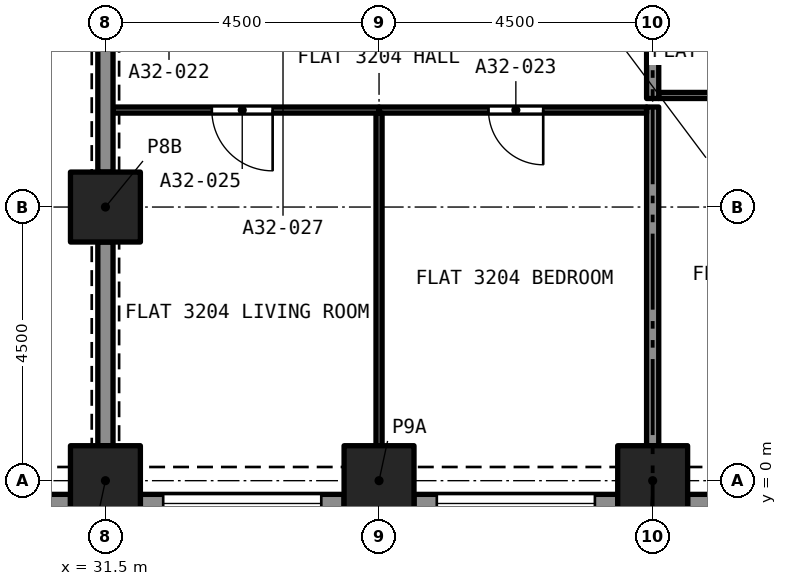
"""IFC4 building model, lengths in metres.
Left out: names, types, materials, properties, quantities, classifications, styles, units other than length and angle.
Written with IfcOpenShell. Run it as: python <this file> out.ifc"""

import sys

from ifc_helpers import new_model, si_unit, direction, frame, frame_2d, origin, origin_2d, place, context, subcontext, project, spatial, rectangle, extrude, element, fill, save


model = new_model("IFC4")
c1 = context("Model", 3, precision=1e-05, world=origin(), true_north=direction((0.0, 1.0)))
c2 = subcontext(c1, "Body", "Model", "MODEL_VIEW")
j1 = project(units=[si_unit("LENGTHUNIT", "METRE"), si_unit("PLANEANGLEUNIT", "RADIAN")], contexts=[c1])
p1 = place(None, origin())
s1 = spatial("IfcSite", under=j1, at=p1, CompositionType="ELEMENT")
p2 = place(p1, origin())
s2 = spatial("IfcBuilding", under=s1, at=p2, CompositionType="ELEMENT")
p3 = place(p2, frame((0.0, 0.0, 115.2)))
s3 = spatial("IfcBuildingStorey", under=s2, at=p3, CompositionType="ELEMENT", Elevation=115.2)
for number, where, z_axis, x_axis in (
    (1, (31.5, 0.0, 0.0), (0.0, 0.0, 1.0), (1.0, 0.0, 0.0)),
    (2, (36.0, 0.0, 0.0), (0.0, 0.0, 1.0), (1.0, 0.0, 0.0)),
    (3, (40.5, 0.0, 0.0), (0.0, 0.0, 1.0), (1.0, 0.0, 0.0)),
    (4, (31.5, 4.5, 0.0), (0.0, 0.0, 1.0), (1.0, 0.0, 0.0)),
):
    element("IfcColumn", number, at=place(p3, frame(where, z_axis=z_axis, x_axis=x_axis)), inside=s3, PredefinedType="COLUMN", context=c2, shape_type="SweptSolid", body=[
        extrude(rectangle(XDim=1.15, YDim=1.15, at=origin_2d()), origin(), (0.0, 0.0, 1.0), 3.2),
    ])
p4 = place(p3, frame((30.925, -0.375, 0.0), z_axis=(0.0, 0.0, 1.0), x_axis=(-1.0, 0.0, 0.0)))
e5 = element("IfcWall", 5, at=p4, inside=s3, PredefinedType="SOLIDWALL", context=c2, shape_type="SweptSolid", body=[
    extrude(rectangle(XDim=3.35, YDim=0.3, at=frame_2d((1.675, 0.0))), origin(), (0.0, 0.0, 1.0), 3.2),
])
p5 = place(p4, frame((0.375, 0.0, 0.45)))
e6 = element("IfcOpeningElement", 6, at=p5, cuts=e5, PredefinedType="OPENING", context=c2, shape_type="SweptSolid", body=[
    extrude(rectangle(XDim=2.6, YDim=1.95, at=frame_2d((1.3, 0.975))), frame((0.0, 0.16, 0.0), z_axis=(0.0, -1.0, 0.0), x_axis=(1.0, 0.0, 0.0)), (0.0, 0.0, 1.0), 0.32),
])
p6 = place(p3, frame((35.425, -0.375, 0.0), z_axis=(0.0, 0.0, 1.0), x_axis=(-1.0, 0.0, 0.0)))
e7 = element("IfcWall", 7, at=p6, inside=s3, PredefinedType="SOLIDWALL", context=c2, shape_type="SweptSolid", body=[
    extrude(rectangle(XDim=3.35, YDim=0.3, at=frame_2d((1.675, 0.0))), origin(), (0.0, 0.0, 1.0), 3.2),
])
p7 = place(p6, frame((0.375, 0.0, 0.45)))
e8 = element("IfcOpeningElement", 8, at=p7, cuts=e7, PredefinedType="OPENING", context=c2, shape_type="SweptSolid", body=[
    extrude(rectangle(XDim=2.6, YDim=1.95, at=frame_2d((1.3, 0.975))), frame((0.0, 0.16, 0.0), z_axis=(0.0, -1.0, 0.0), x_axis=(1.0, 0.0, 0.0)), (0.0, 0.0, 1.0), 0.32),
])
p8 = place(p3, frame((39.925, -0.375, 0.0), z_axis=(0.0, 0.0, 1.0), x_axis=(-1.0, 0.0, 0.0)))
e9 = element("IfcWall", 9, at=p8, inside=s3, PredefinedType="SOLIDWALL", context=c2, shape_type="SweptSolid", body=[
    extrude(rectangle(XDim=3.35, YDim=0.3, at=frame_2d((1.675, 0.0))), origin(), (0.0, 0.0, 1.0), 3.2),
])
p9 = place(p8, frame((0.375, 0.0, 0.45)))
e10 = element("IfcOpeningElement", 10, at=p9, cuts=e9, PredefinedType="OPENING", context=c2, shape_type="SweptSolid", body=[
    extrude(rectangle(XDim=2.6, YDim=1.95, at=frame_2d((1.3, 0.975))), frame((0.0, 0.16, 0.0), z_axis=(0.0, -1.0, 0.0), x_axis=(1.0, 0.0, 0.0)), (0.0, 0.0, 1.0), 0.32),
])
p10 = place(p3, frame((44.425, -0.375, 0.0), z_axis=(0.0, 0.0, 1.0), x_axis=(-1.0, 0.0, 0.0)))
e11 = element("IfcWall", 11, at=p10, inside=s3, PredefinedType="SOLIDWALL", context=c2, shape_type="SweptSolid", body=[
    extrude(rectangle(XDim=3.35, YDim=0.3, at=frame_2d((1.675, 0.0))), origin(), (0.0, 0.0, 1.0), 3.2),
])
p11 = place(p10, frame((0.375, 0.0, 0.45)))
e12 = element("IfcOpeningElement", 12, at=p11, cuts=e11, PredefinedType="OPENING", context=c2, shape_type="SweptSolid", body=[
    extrude(rectangle(XDim=2.6, YDim=1.95, at=frame_2d((1.3, 0.975))), frame((0.0, 0.16, 0.0), z_axis=(0.0, -1.0, 0.0), x_axis=(1.0, 0.0, 0.0)), (0.0, 0.0, 1.0), 0.32),
])
p12 = place(p3, frame((44.95, 6.335, 0.0), z_axis=(0.0, 0.0, 1.0), x_axis=(-1.0, 0.0, 0.0)))
e13 = element("IfcWall", 13, at=p12, inside=s3, PredefinedType="PARTITIONING", context=c2, shape_type="SweptSolid", body=[
    extrude(rectangle(XDim=4.35, YDim=0.1, at=frame_2d((2.175, 0.0))), origin(), (0.0, 0.0, 1.0), 2.9),
])
p13 = place(p12, frame((1.75, 0.0, 0.0)))
e14 = element("IfcOpeningElement", 14, at=p13, cuts=e13, PredefinedType="OPENING", context=c2, shape_type="SweptSolid", body=[
    extrude(rectangle(XDim=0.9, YDim=2.1, at=frame_2d((0.45, 1.05))), frame((0.0, 0.06, 0.0), z_axis=(0.0, -1.0, 0.0), x_axis=(1.0, 0.0, 0.0)), (0.0, 0.0, 1.0), 0.12),
])
p14 = place(p3, frame((40.5, 0.575, 0.0), z_axis=(0.0, 0.0, 1.0), x_axis=(0.0, 1.0, 0.0)))
e15 = element("IfcWall", 15, at=p14, inside=s3, PredefinedType="PARTITIONING", context=c2, shape_type="SweptSolid", body=[
    extrude(rectangle(XDim=5.57, YDim=0.2, at=frame_2d((2.785, 0.0))), origin(), (0.0, 0.0, 1.0), 2.9),
])
p15 = place(p3, frame((40.5, 6.285, 0.0), z_axis=(0.0, 0.0, 1.0), x_axis=(0.0, 1.0, 0.0)))
e16 = element("IfcWall", 16, at=p15, inside=s3, PredefinedType="PARTITIONING", context=c2, shape_type="SweptSolid", body=[
    extrude(rectangle(XDim=7.715, YDim=0.2, at=frame_2d((3.857, 0.0))), origin(), (0.0, 0.0, 1.0), 2.9),
])
p16 = place(p3, frame((40.4, 6.095, 0.0), z_axis=(0.0, 0.0, 1.0), x_axis=(-1.0, 0.0, 0.0)))
e17 = element("IfcWall", 17, at=p16, inside=s3, PredefinedType="PARTITIONING", context=c2, shape_type="SweptSolid", body=[
    extrude(rectangle(XDim=4.4, YDim=0.1, at=frame_2d((2.2, 0.0))), origin(), (0.0, 0.0, 1.0), 2.9),
])
p17 = place(p16, frame((1.7, 0.0, 0.0)))
e18 = element("IfcOpeningElement", 18, at=p17, cuts=e17, PredefinedType="OPENING", context=c2, shape_type="SweptSolid", body=[
    extrude(rectangle(XDim=0.9, YDim=2.1, at=frame_2d((0.45, 1.05))), frame((0.0, 0.06, 0.0), z_axis=(0.0, -1.0, 0.0), x_axis=(1.0, 0.0, 0.0)), (0.0, 0.0, 1.0), 0.12),
])
p18 = place(p3, frame((36.0, 0.575, 0.0), z_axis=(0.0, 0.0, 1.0), x_axis=(0.0, 1.0, 0.0)))
e19 = element("IfcWall", 19, at=p18, inside=s3, PredefinedType="PARTITIONING", context=c2, shape_type="SweptSolid", body=[
    extrude(rectangle(XDim=5.47, YDim=0.1, at=frame_2d((2.735, 0.0))), origin(), (0.0, 0.0, 1.0), 2.9),
])
p19 = place(p3, frame((36.0, 6.095, 0.0), z_axis=(0.0, 0.0, 1.0), x_axis=(-1.0, 0.0, 0.0)))
e20 = element("IfcWall", 20, at=p19, inside=s3, PredefinedType="PARTITIONING", context=c2, shape_type="SweptSolid", body=[
    extrude(rectangle(XDim=4.375, YDim=0.1, at=frame_2d((2.188, 0.0))), origin(), (0.0, 0.0, 1.0), 2.9),
])
p20 = place(p19, frame((1.75, 0.0, 0.0)))
e21 = element("IfcOpeningElement", 21, at=p20, cuts=e20, PredefinedType="OPENING", context=c2, shape_type="SweptSolid", body=[
    extrude(rectangle(XDim=1.0, YDim=2.1, at=frame_2d((0.5, 1.05))), frame((0.0, 0.06, 0.0), z_axis=(0.0, -1.0, 0.0), x_axis=(1.0, 0.0, 0.0)), (0.0, 0.0, 1.0), 0.12),
])
for number, where, z_axis, x_axis in (
    (22, (31.5, 0.575, 0.0), (0.0, 0.0, 1.0), (0.0, 1.0, 0.0)),
    (23, (31.5, 5.075, 0.0), (0.0, 0.0, 1.0), (0.0, 1.0, 0.0)),
):
    element("IfcWall", number, at=place(p3, frame(where, z_axis=z_axis, x_axis=x_axis)), inside=s3, PredefinedType="PARTITIONING", context=c2, shape_type="SweptSolid", body=[
        extrude(rectangle(XDim=3.35, YDim=0.25, at=frame_2d((1.675, 0.0))), origin(), (0.0, 0.0, 1.0), 2.38),
    ])
p21 = place(p7, origin())
e24 = element("IfcWindow", 24, at=p21, inside=s3, PartitioningType="SINGLE_PANEL", PredefinedType="WINDOW", context=c2, shape_type="SweptSolid", body=[
    extrude(rectangle(XDim=2.6, YDim=1.95, at=frame_2d((1.3, 0.975))), frame((0.0, 0.03, 0.0), z_axis=(0.0, -1.0, 0.0), x_axis=(1.0, 0.0, 0.0)), (0.0, 0.0, 1.0), 0.06),
])
fill(e8, e24)
p22 = place(p9, origin())
e25 = element("IfcWindow", 25, at=p22, inside=s3, PartitioningType="SINGLE_PANEL", PredefinedType="WINDOW", context=c2, shape_type="SweptSolid", body=[
    extrude(rectangle(XDim=2.6, YDim=1.95, at=frame_2d((1.3, 0.975))), frame((0.0, 0.03, 0.0), z_axis=(0.0, -1.0, 0.0), x_axis=(1.0, 0.0, 0.0)), (0.0, 0.0, 1.0), 0.06),
])
fill(e10, e25)
p23 = place(p17, origin())
e26 = element("IfcDoor", 26, at=p23, inside=s3, OperationType="SINGLE_SWING_LEFT", PredefinedType="DOOR", context=c2, shape_type="SweptSolid", body=[
    extrude(rectangle(XDim=0.9, YDim=2.1, at=frame_2d((0.45, 1.05))), frame((0.0, 0.025, 0.0), z_axis=(0.0, -1.0, 0.0), x_axis=(1.0, 0.0, 0.0)), (0.0, 0.0, 1.0), 0.05),
])
fill(e18, e26)
p24 = place(p20, origin())
e27 = element("IfcDoor", 27, at=p24, inside=s3, OperationType="SINGLE_SWING_RIGHT", PredefinedType="DOOR", context=c2, shape_type="SweptSolid", body=[
    extrude(rectangle(XDim=1.0, YDim=2.1, at=frame_2d((0.5, 1.05))), frame((0.0, 0.025, 0.0), z_axis=(0.0, -1.0, 0.0), x_axis=(1.0, 0.0, 0.0)), (0.0, 0.0, 1.0), 0.05),
])
fill(e21, e27)
save(model, sys.argv[1])
